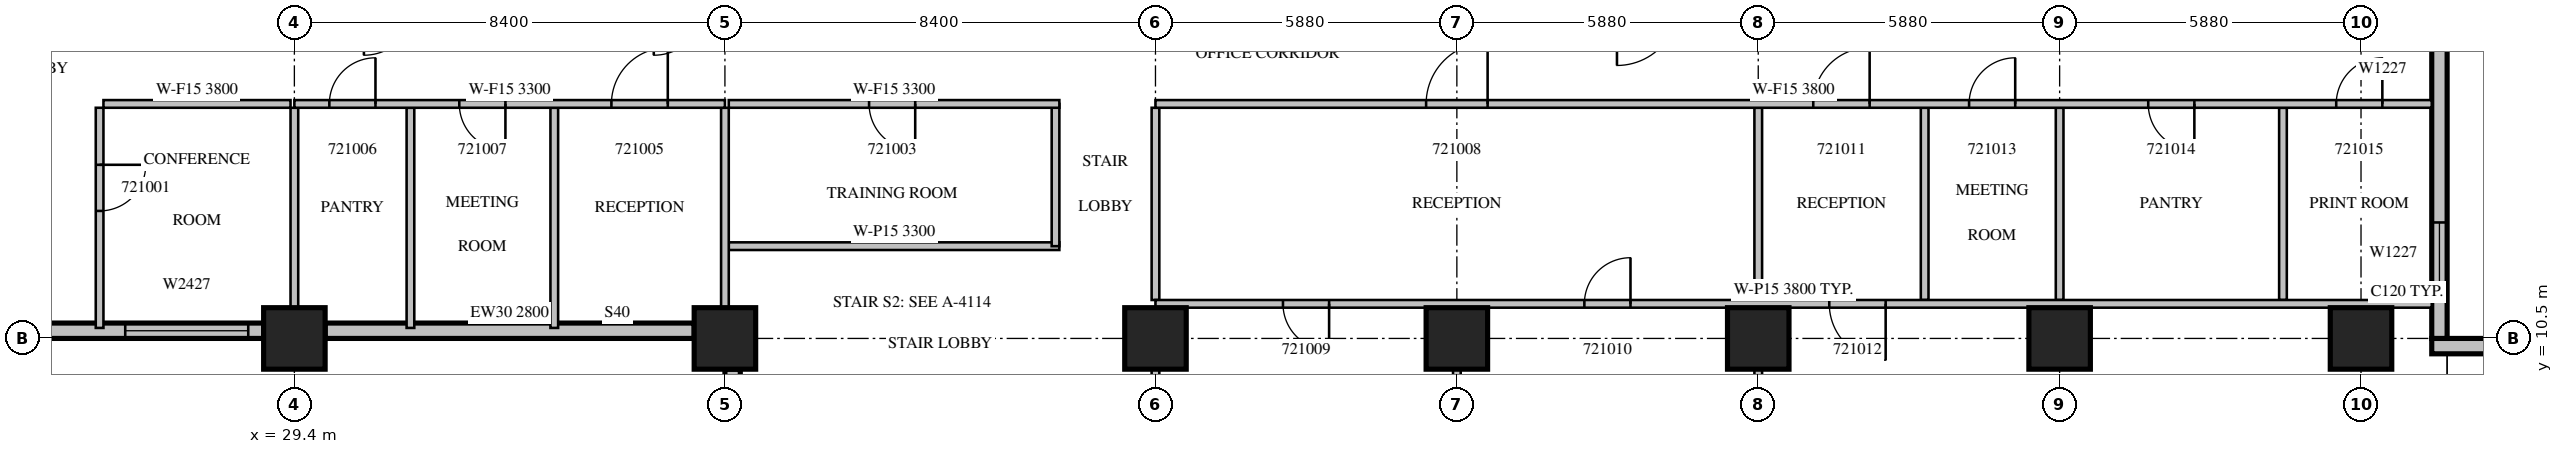
"""IFC4 building model, lengths in metres.
Left out: names, types, materials, properties, quantities, classifications, styles, units other than length and angle.
Written with IfcOpenShell. Run it as: python <this file> out.ifc"""

import sys

from ifc_helpers import new_model, si_unit, direction, frame, frame_2d, origin, origin_2d, place, context, subcontext, project, spatial, rectangle, extrude, source, transform, mapped, element, fill, save


model = new_model("IFC4")
c1 = context("Model", 3, precision=1e-05, world=origin(), true_north=direction((0.0, 1.0)))
c2 = subcontext(c1, "Body", "Model", "MODEL_VIEW")
j1 = project(units=[si_unit("LENGTHUNIT", "METRE"), si_unit("PLANEANGLEUNIT", "RADIAN")], contexts=[c1])
p1 = place(None, origin())
s1 = spatial("IfcSite", under=j1, at=p1, CompositionType="ELEMENT")
p2 = place(p1, origin())
s2 = spatial("IfcBuilding", under=s1, at=p2, CompositionType="ELEMENT")
p3 = place(p2, frame((0.0, 0.0, 99.3)))
s3 = spatial("IfcBuildingStorey", under=s2, at=p3, CompositionType="ELEMENT", Elevation=99.3)
m1 = source(origin(), c2, "Body", "SweptSolid", [
    extrude(rectangle(XDim=1.2, YDim=1.2, at=origin_2d()), origin(), (0.0, 0.0, 1.0), 4.2),
])
for number, where, z_axis, x_axis in (
    (1, (29.4, 10.5, 0.0), (0.0, 0.0, 1.0), (1.0, 0.0, 0.0)),
    (2, (37.8, 10.5, 0.0), (0.0, 0.0, 1.0), (1.0, 0.0, 0.0)),
    (3, (46.2, 10.5, 0.0), (0.0, 0.0, 1.0), (1.0, 0.0, 0.0)),
    (4, (52.08, 10.5, 0.0), (0.0, 0.0, 1.0), (1.0, 0.0, 0.0)),
    (5, (57.96, 10.5, 0.0), (0.0, 0.0, 1.0), (1.0, 0.0, 0.0)),
    (6, (63.84, 10.5, 0.0), (0.0, 0.0, 1.0), (1.0, 0.0, 0.0)),
    (7, (69.72, 10.5, 0.0), (0.0, 0.0, 1.0), (1.0, 0.0, 0.0)),
):
    element("IfcColumn", number, at=place(p3, frame(where, z_axis=z_axis, x_axis=x_axis)), inside=s3, PredefinedType="COLUMN", context=c2, shape_type="MappedRepresentation", body=[
        mapped(m1, transform((0.0, 0.0, 0.0), scale=1.0)),
    ])
m2 = source(origin(), c2, "Body", "SweptSolid", [
    extrude(rectangle(XDim=6.6, YDim=0.3, at=frame_2d((3.3, 0.0))), origin(), (0.0, 0.0, 1.0), 3.8),
])
p4 = place(p3, frame((22.2, 10.65, 0.0), z_axis=(0.0, 0.0, 1.0), x_axis=(1.0, 0.0, 0.0)))
e8 = element("IfcWall", 8, at=p4, inside=s3, PredefinedType="STANDARD", context=c2, shape_type="MappedRepresentation", body=[
    mapped(m2, transform((0.0, 0.0, 0.0), scale=1.0)),
])
m3 = source(origin(), c2, "Body", "SweptSolid", [
    extrude(rectangle(XDim=1.2, YDim=2.7, at=frame_2d((0.6, 1.35))), frame((0.0, 0.16, 0.0), z_axis=(0.0, -1.0, 0.0), x_axis=(1.0, 0.0, 0.0)), (0.0, 0.0, 1.0), 0.32),
])
p5 = place(p4, frame((0.3, 0.0, 0.6)))
e9 = element("IfcOpeningElement", 9, at=p5, cuts=e8, PredefinedType="OPENING", context=c2, shape_type="MappedRepresentation", body=[
    mapped(m3, transform((0.0, 0.0, 0.0), scale=1.0)),
])
m4 = source(origin(), c2, "Body", "SweptSolid", [
    extrude(rectangle(XDim=2.4, YDim=2.7, at=frame_2d((1.2, 1.35))), frame((0.0, 0.16, 0.0), z_axis=(0.0, -1.0, 0.0), x_axis=(1.0, 0.0, 0.0)), (0.0, 0.0, 1.0), 0.32),
])
p6 = place(p4, frame((3.9, 0.0, 0.6)))
e10 = element("IfcOpeningElement", 10, at=p6, cuts=e8, PredefinedType="OPENING", context=c2, shape_type="MappedRepresentation", body=[
    mapped(m4, transform((0.0, 0.0, 0.0), scale=1.0)),
])
m5 = source(origin(), c2, "Body", "SweptSolid", [
    extrude(rectangle(XDim=7.2, YDim=0.3, at=frame_2d((3.6, 0.0))), origin(), (0.0, 0.0, 1.0), 2.8),
])
p7 = place(p3, frame((30.0, 10.65, 0.0), z_axis=(0.0, 0.0, 1.0), x_axis=(1.0, 0.0, 0.0)))
e11 = element("IfcWall", 11, at=p7, inside=s3, PredefinedType="STANDARD", context=c2, shape_type="MappedRepresentation", body=[
    mapped(m5, transform((0.0, 0.0, 0.0), scale=1.0)),
])
m6 = source(origin(), c2, "Body", "SweptSolid", [
    extrude(rectangle(XDim=8.7, YDim=0.3, at=frame_2d((4.35, 0.0))), origin(), (0.0, 0.0, 1.0), 3.8),
])
p8 = place(p3, frame((37.95, 9.9, 0.0), z_axis=(0.0, 0.0, 1.0), x_axis=(0.0, -1.0, 0.0)))
e12 = element("IfcWall", 12, at=p8, inside=s3, PredefinedType="STANDARD", context=c2, shape_type="MappedRepresentation", body=[
    mapped(m6, transform((0.0, 0.0, 0.0), scale=1.0)),
])
m7 = source(origin(), c2, "Body", "SweptSolid", [
    extrude(rectangle(XDim=1.8, YDim=2.7, at=frame_2d((0.9, 1.35))), frame((0.0, 0.16, 0.0), z_axis=(0.0, -1.0, 0.0), x_axis=(1.0, 0.0, 0.0)), (0.0, 0.0, 1.0), 0.32),
])
p9 = place(p8, frame((1.812, 0.0, 0.6)))
e13 = element("IfcOpeningElement", 13, at=p9, cuts=e12, PredefinedType="OPENING", context=c2, shape_type="MappedRepresentation", body=[
    mapped(m7, transform((0.0, 0.0, 0.0), scale=1.0)),
])
p10 = place(p8, frame((6.075, 0.0, 0.6)))
e14 = element("IfcOpeningElement", 14, at=p10, cuts=e12, PredefinedType="OPENING", context=c2, shape_type="MappedRepresentation", body=[
    mapped(m4, transform((0.0, 0.0, 0.0), scale=1.0)),
])
m8 = source(origin(), c2, "Body", "SweptSolid", [
    extrude(rectangle(XDim=1.2, YDim=0.3, at=frame_2d((0.6, 0.0))), origin(), (0.0, 0.0, 1.0), 3.8),
])
p11 = place(p3, frame((71.1, 10.35, 0.0), z_axis=(0.0, 0.0, 1.0), x_axis=(1.0, 0.0, 0.0)))
e15 = element("IfcWall", 15, at=p11, inside=s3, PredefinedType="STANDARD", context=c2, shape_type="MappedRepresentation", body=[
    mapped(m8, transform((0.0, 0.0, 0.0), scale=1.0)),
])
m9 = source(origin(), c2, "Body", "SweptSolid", [
    extrude(rectangle(XDim=6.3, YDim=0.3, at=frame_2d((3.15, 0.0))), origin(), (0.0, 0.0, 1.0), 3.8),
])
p12 = place(p3, frame((71.25, 10.5, 0.0), z_axis=(0.0, 0.0, 1.0), x_axis=(0.0, 1.0, 0.0)))
e16 = element("IfcWall", 16, at=p12, inside=s3, PredefinedType="STANDARD", context=c2, shape_type="MappedRepresentation", body=[
    mapped(m9, transform((0.0, 0.0, 0.0), scale=1.0)),
])
p13 = place(p12, frame((1.062, 0.0, 0.6)))
e17 = element("IfcOpeningElement", 17, at=p13, cuts=e16, PredefinedType="OPENING", context=c2, shape_type="MappedRepresentation", body=[
    mapped(m3, transform((0.0, 0.0, 0.0), scale=1.0)),
])
m10 = source(origin(), c2, "Body", "SweptSolid", [
    extrude(rectangle(XDim=4.295, YDim=0.15, at=frame_2d((2.147, 0.0))), origin(), (0.0, 0.0, 1.0), 3.8),
])
p14 = place(p3, frame((25.6, 15.0, 0.0), z_axis=(0.0, 0.0, 1.0), x_axis=(0.0, -1.0, 0.0)))
e18 = element("IfcWall", 18, at=p14, inside=s3, PredefinedType="PARTITIONING", context=c2, shape_type="MappedRepresentation", body=[
    mapped(m10, transform((0.0, 0.0, 0.0), scale=1.0)),
])
m11 = source(origin(), c2, "Body", "SweptSolid", [
    extrude(rectangle(XDim=0.9, YDim=2.1, at=frame_2d((0.45, 1.05))), frame((0.0, 0.085, 0.0), z_axis=(0.0, -1.0, 0.0), x_axis=(1.0, 0.0, 0.0)), (0.0, 0.0, 1.0), 0.17),
])
p15 = place(p14, frame((1.113, 0.0, 0.0)))
e19 = element("IfcOpeningElement", 19, at=p15, cuts=e18, PredefinedType="OPENING", context=c2, shape_type="MappedRepresentation", body=[
    mapped(m11, transform((0.0, 0.0, 0.0), scale=1.0)),
])
m12 = source(origin(), c2, "Body", "SweptSolid", [
    extrude(rectangle(XDim=3.65, YDim=0.15, at=frame_2d((1.825, 0.0))), origin(), (0.0, 0.0, 1.0), 3.8),
])
p16 = place(p3, frame((29.325, 15.075, 0.0), z_axis=(0.0, 0.0, 1.0), x_axis=(-1.0, 0.0, 0.0)))
e20 = element("IfcWall", 20, at=p16, inside=s3, PredefinedType="PARTITIONING", context=c2, shape_type="MappedRepresentation", body=[
    mapped(m12, transform((0.0, 0.0, 0.0), scale=1.0)),
])
m13 = source(origin(), c2, "Body", "SweptSolid", [
    extrude(rectangle(XDim=3.901, YDim=0.15, at=frame_2d((1.95, 0.0))), origin(), (0.0, 0.0, 1.0), 3.8),
])
p17 = place(p3, frame((29.4, 11.099, 0.0), z_axis=(0.0, 0.0, 1.0), x_axis=(0.0, 1.0, 0.0)))
e21 = element("IfcWall", 21, at=p17, inside=s3, PredefinedType="PARTITIONING", context=c2, shape_type="MappedRepresentation", body=[
    mapped(m13, transform((0.0, 0.0, 0.0), scale=1.0)),
])
p18 = place(p3, frame((37.875, 12.3, 0.0), z_axis=(0.0, 0.0, 1.0), x_axis=(1.0, 0.0, 0.0)))
e22 = element("IfcWall", 22, at=p18, inside=s3, PredefinedType="PARTITIONING", context=c2, shape_type="SweptSolid", body=[
    extrude(rectangle(XDim=6.45, YDim=0.15, at=frame_2d((3.225, 0.0))), origin(), (0.0, 0.0, 1.0), 3.3),
])
m14 = source(origin(), c2, "Body", "SweptSolid", [
    extrude(rectangle(XDim=2.775, YDim=0.15, at=frame_2d((1.387, 0.0))), origin(), (0.0, 0.0, 1.0), 3.8),
])
p19 = place(p3, frame((44.25, 12.3, 0.0), z_axis=(0.0, 0.0, 1.0), x_axis=(0.0, 1.0, 0.0)))
e23 = element("IfcWall", 23, at=p19, inside=s3, PredefinedType="PARTITIONING", context=c2, shape_type="MappedRepresentation", body=[
    mapped(m14, transform((0.0, 0.0, 0.0), scale=1.0)),
])
m15 = source(origin(), c2, "Body", "SweptSolid", [
    extrude(rectangle(XDim=6.45, YDim=0.15, at=frame_2d((3.225, 0.0))), origin(), (0.0, 0.0, 1.0), 3.3),
])
p20 = place(p3, frame((44.325, 15.075, 0.0), z_axis=(0.0, 0.0, 1.0), x_axis=(-1.0, 0.0, 0.0)))
e24 = element("IfcWall", 24, at=p20, inside=s3, PredefinedType="PARTITIONING", context=c2, shape_type="MappedRepresentation", body=[
    mapped(m15, transform((0.0, 0.0, 0.0), scale=1.0)),
])
p21 = place(p20, frame((2.812, 0.0, 0.0)))
e25 = element("IfcOpeningElement", 25, at=p21, cuts=e24, PredefinedType="OPENING", context=c2, shape_type="MappedRepresentation", body=[
    mapped(m11, transform((0.0, 0.0, 0.0), scale=1.0)),
])
for number, where, z_axis, x_axis in (
    (26, (31.665, 10.705, 0.0), (0.0, 0.0, 1.0), (0.0, 1.0, 0.0)),
    (27, (34.471, 10.705, 0.0), (0.0, 0.0, 1.0), (0.0, 1.0, 0.0)),
):
    element("IfcWall", number, at=place(p3, frame(where, z_axis=z_axis, x_axis=x_axis)), inside=s3, PredefinedType="PARTITIONING", context=c2, shape_type="MappedRepresentation", body=[
        mapped(m10, transform((0.0, 0.0, 0.0), scale=1.0)),
    ])
p22 = place(p3, frame((37.8, 11.099, 0.0), z_axis=(0.0, 0.0, 1.0), x_axis=(0.0, 1.0, 0.0)))
e28 = element("IfcWall", 28, at=p22, inside=s3, PredefinedType="PARTITIONING", context=c2, shape_type="MappedRepresentation", body=[
    mapped(m13, transform((0.0, 0.0, 0.0), scale=1.0)),
])
m16 = source(origin(), c2, "Body", "SweptSolid", [
    extrude(rectangle(XDim=8.702, YDim=0.15, at=frame_2d((4.351, 0.0))), origin(), (0.0, 0.0, 1.0), 3.8),
])
p23 = place(p3, frame((52.08, 1.199, 0.0), z_axis=(0.0, 0.0, 1.0), x_axis=(0.0, 1.0, 0.0)))
e29 = element("IfcWall", 29, at=p23, inside=s3, PredefinedType="PARTITIONING", context=c2, shape_type="MappedRepresentation", body=[
    mapped(m16, transform((0.0, 0.0, 0.0), scale=1.0)),
])
m17 = source(origin(), c2, "Body", "SweptSolid", [
    extrude(rectangle(XDim=3.75, YDim=0.15, at=frame_2d((1.875, 0.0))), origin(), (0.0, 0.0, 1.0), 3.8),
])
for number, where, z_axis, x_axis in (
    (30, (61.207, 11.25, 0.0), (0.0, 0.0, 1.0), (0.0, 1.0, 0.0)),
    (31, (63.84, 11.25, 0.0), (0.0, 0.0, 1.0), (0.0, 1.0, 0.0)),
    (32, (68.197, 11.25, 0.0), (0.0, 0.0, 1.0), (0.0, 1.0, 0.0)),
):
    element("IfcWall", number, at=place(p3, frame(where, z_axis=z_axis, x_axis=x_axis)), inside=s3, PredefinedType="PARTITIONING", context=c2, shape_type="MappedRepresentation", body=[
        mapped(m17, transform((0.0, 0.0, 0.0), scale=1.0)),
    ])
p24 = place(p3, frame((46.2, 1.199, 0.0), z_axis=(0.0, 0.0, 1.0), x_axis=(0.0, 1.0, 0.0)))
e33 = element("IfcWall", 33, at=p24, inside=s3, PredefinedType="PARTITIONING", context=c2, shape_type="MappedRepresentation", body=[
    mapped(m16, transform((0.0, 0.0, 0.0), scale=1.0)),
])
p25 = place(p3, frame((46.2, 11.25, 0.0), z_axis=(0.0, 0.0, 1.0), x_axis=(0.0, 1.0, 0.0)))
e34 = element("IfcWall", 34, at=p25, inside=s3, PredefinedType="PARTITIONING", context=c2, shape_type="MappedRepresentation", body=[
    mapped(m17, transform((0.0, 0.0, 0.0), scale=1.0)),
])
p26 = place(p3, frame((57.96, 1.199, 0.0), z_axis=(0.0, 0.0, 1.0), x_axis=(0.0, 1.0, 0.0)))
e35 = element("IfcWall", 35, at=p26, inside=s3, PredefinedType="PARTITIONING", context=c2, shape_type="MappedRepresentation", body=[
    mapped(m16, transform((0.0, 0.0, 0.0), scale=1.0)),
])
p27 = place(p3, frame((57.96, 11.25, 0.0), z_axis=(0.0, 0.0, 1.0), x_axis=(0.0, 1.0, 0.0)))
e36 = element("IfcWall", 36, at=p27, inside=s3, PredefinedType="PARTITIONING", context=c2, shape_type="MappedRepresentation", body=[
    mapped(m17, transform((0.0, 0.0, 0.0), scale=1.0)),
])
m18 = source(origin(), c2, "Body", "SweptSolid", [
    extrude(rectangle(XDim=24.9, YDim=0.15, at=frame_2d((12.45, 0.0))), origin(), (0.0, 0.0, 1.0), 3.8),
])
p28 = place(p3, frame((71.1, 11.175, 0.0), z_axis=(0.0, 0.0, 1.0), x_axis=(-1.0, 0.0, 0.0)))
e37 = element("IfcWall", 37, at=p28, inside=s3, PredefinedType="PARTITIONING", context=c2, shape_type="MappedRepresentation", body=[
    mapped(m18, transform((0.0, 0.0, 0.0), scale=1.0)),
])
p29 = place(p28, frame((21.512, 0.0, 0.0)))
e38 = element("IfcOpeningElement", 38, at=p29, cuts=e37, PredefinedType="OPENING", context=c2, shape_type="MappedRepresentation", body=[
    mapped(m11, transform((0.0, 0.0, 0.0), scale=1.0)),
])
p30 = place(p28, frame((15.633, 0.0, 0.0)))
e39 = element("IfcOpeningElement", 39, at=p30, cuts=e37, PredefinedType="OPENING", context=c2, shape_type="MappedRepresentation", body=[
    mapped(m11, transform((0.0, 0.0, 0.0), scale=1.0)),
])
m19 = source(origin(), c2, "Body", "SweptSolid", [
    extrude(rectangle(XDim=1.1, YDim=2.1, at=frame_2d((0.55, 1.05))), frame((0.0, 0.085, 0.0), z_axis=(0.0, -1.0, 0.0), x_axis=(1.0, 0.0, 0.0)), (0.0, 0.0, 1.0), 0.17),
])
p31 = place(p28, frame((10.654, 0.0, 0.0)))
e40 = element("IfcOpeningElement", 40, at=p31, cuts=e37, PredefinedType="OPENING", context=c2, shape_type="MappedRepresentation", body=[
    mapped(m19, transform((0.0, 0.0, 0.0), scale=1.0)),
])
m20 = source(origin(), c2, "Body", "SweptSolid", [
    extrude(rectangle(XDim=8.4, YDim=0.15, at=frame_2d((4.2, 0.0))), origin(), (0.0, 0.0, 1.0), 3.3),
])
p32 = place(p3, frame((37.8, 15.075, 0.0), z_axis=(0.0, 0.0, 1.0), x_axis=(-1.0, 0.0, 0.0)))
e41 = element("IfcWall", 41, at=p32, inside=s3, PredefinedType="PARTITIONING", context=c2, shape_type="MappedRepresentation", body=[
    mapped(m20, transform((0.0, 0.0, 0.0), scale=1.0)),
])
p33 = place(p32, frame((1.115, 0.0, 0.0)))
e42 = element("IfcOpeningElement", 42, at=p33, cuts=e41, PredefinedType="OPENING", context=c2, shape_type="MappedRepresentation", body=[
    mapped(m19, transform((0.0, 0.0, 0.0), scale=1.0)),
])
p34 = place(p32, frame((6.818, 0.0, 0.0)))
e43 = element("IfcOpeningElement", 43, at=p34, cuts=e41, PredefinedType="OPENING", context=c2, shape_type="MappedRepresentation", body=[
    mapped(m11, transform((0.0, 0.0, 0.0), scale=1.0)),
])
p35 = place(p32, frame((4.282, 0.0, 0.0)))
e44 = element("IfcOpeningElement", 44, at=p35, cuts=e41, PredefinedType="OPENING", context=c2, shape_type="MappedRepresentation", body=[
    mapped(m11, transform((0.0, 0.0, 0.0), scale=1.0)),
])
p36 = place(p3, frame((71.1, 15.075, 0.0), z_axis=(0.0, 0.0, 1.0), x_axis=(-1.0, 0.0, 0.0)))
e45 = element("IfcWall", 45, at=p36, inside=s3, PredefinedType="PARTITIONING", context=c2, shape_type="MappedRepresentation", body=[
    mapped(m18, transform((0.0, 0.0, 0.0), scale=1.0)),
])
m21 = source(origin(), c2, "Body", "SweptSolid", [
    extrude(rectangle(XDim=1.2, YDim=2.1, at=frame_2d((0.6, 1.05))), frame((0.0, 0.085, 0.0), z_axis=(0.0, -1.0, 0.0), x_axis=(1.0, 0.0, 0.0)), (0.0, 0.0, 1.0), 0.17),
])
p37 = place(p36, frame((18.42, 0.0, 0.0)))
e46 = element("IfcOpeningElement", 46, at=p37, cuts=e45, PredefinedType="OPENING", context=c2, shape_type="MappedRepresentation", body=[
    mapped(m21, transform((0.0, 0.0, 0.0), scale=1.0)),
])
p38 = place(p36, frame((10.967, 0.0, 0.0)))
e47 = element("IfcOpeningElement", 47, at=p38, cuts=e45, PredefinedType="OPENING", context=c2, shape_type="MappedRepresentation", body=[
    mapped(m19, transform((0.0, 0.0, 0.0), scale=1.0)),
])
p39 = place(p36, frame((8.127, 0.0, 0.0)))
e48 = element("IfcOpeningElement", 48, at=p39, cuts=e45, PredefinedType="OPENING", context=c2, shape_type="MappedRepresentation", body=[
    mapped(m11, transform((0.0, 0.0, 0.0), scale=1.0)),
])
p40 = place(p36, frame((4.631, 0.0, 0.0)))
e49 = element("IfcOpeningElement", 49, at=p40, cuts=e45, PredefinedType="OPENING", context=c2, shape_type="MappedRepresentation", body=[
    mapped(m11, transform((0.0, 0.0, 0.0), scale=1.0)),
])
p41 = place(p36, frame((0.964, 0.0, 0.0)))
e50 = element("IfcOpeningElement", 50, at=p41, cuts=e45, PredefinedType="OPENING", context=c2, shape_type="MappedRepresentation", body=[
    mapped(m11, transform((0.0, 0.0, 0.0), scale=1.0)),
])
m22 = source(origin(), c2, "Body", "SweptSolid", [
    extrude(rectangle(XDim=2.4, YDim=2.7, at=frame_2d((1.2, 1.35))), frame((0.0, 0.03, 0.0), z_axis=(0.0, -1.0, 0.0), x_axis=(1.0, 0.0, 0.0)), (0.0, 0.0, 1.0), 0.06),
])
p42 = place(p6, origin())
e51 = element("IfcWindow", 51, at=p42, inside=s3, PartitioningType="SINGLE_PANEL", PredefinedType="WINDOW", context=c2, shape_type="MappedRepresentation", body=[
    mapped(m22, transform((0.0, 0.0, 0.0), scale=1.0)),
])
fill(e10, e51)
m23 = source(origin(), c2, "Body", "SweptSolid", [
    extrude(rectangle(XDim=1.2, YDim=2.7, at=frame_2d((0.6, 1.35))), frame((0.0, 0.03, 0.0), z_axis=(0.0, -1.0, 0.0), x_axis=(1.0, 0.0, 0.0)), (0.0, 0.0, 1.0), 0.06),
])
p43 = place(p13, origin())
e52 = element("IfcWindow", 52, at=p43, inside=s3, PartitioningType="SINGLE_PANEL", PredefinedType="WINDOW", context=c2, shape_type="MappedRepresentation", body=[
    mapped(m23, transform((0.0, 0.0, 0.0), scale=1.0)),
])
fill(e17, e52)
m24 = source(origin(), c2, "Body", "SweptSolid", [
    extrude(rectangle(XDim=0.9, YDim=2.1, at=frame_2d((0.45, 1.05))), frame((0.0, 0.025, 0.0), z_axis=(0.0, -1.0, 0.0), x_axis=(1.0, 0.0, 0.0)), (0.0, 0.0, 1.0), 0.05),
])
p44 = place(p15, origin())
e53 = element("IfcDoor", 53, at=p44, inside=s3, OperationType="SINGLE_SWING_LEFT", PredefinedType="DOOR", context=c2, shape_type="MappedRepresentation", body=[
    mapped(m24, transform((0.0, 0.0, 0.0), scale=1.0)),
])
fill(e19, e53)
p45 = place(p21, origin())
e54 = element("IfcDoor", 54, at=p45, inside=s3, OperationType="SINGLE_SWING_LEFT", PredefinedType="DOOR", context=c2, shape_type="MappedRepresentation", body=[
    mapped(m24, transform((0.0, 0.0, 0.0), scale=1.0)),
])
fill(e25, e54)
m25 = source(origin(), c2, "Body", "SweptSolid", [
    extrude(rectangle(XDim=1.1, YDim=2.1, at=frame_2d((0.55, 1.05))), frame((0.0, 0.025, 0.0), z_axis=(0.0, -1.0, 0.0), x_axis=(1.0, 0.0, 0.0)), (0.0, 0.0, 1.0), 0.05),
])
p46 = place(p33, origin())
e55 = element("IfcDoor", 55, at=p46, inside=s3, OperationType="SINGLE_SWING_RIGHT", PredefinedType="DOOR", context=c2, shape_type="MappedRepresentation", body=[
    mapped(m25, transform((0.0, 0.0, 0.0), scale=1.0)),
])
fill(e42, e55)
p47 = place(p34, origin())
e56 = element("IfcDoor", 56, at=p47, inside=s3, OperationType="SINGLE_SWING_RIGHT", PredefinedType="DOOR", context=c2, shape_type="MappedRepresentation", body=[
    mapped(m24, transform((0.0, 0.0, 0.0), scale=1.0)),
])
fill(e43, e56)
p48 = place(p35, origin())
e57 = element("IfcDoor", 57, at=p48, inside=s3, OperationType="SINGLE_SWING_LEFT", PredefinedType="DOOR", context=c2, shape_type="MappedRepresentation", body=[
    mapped(m24, transform((0.0, 0.0, 0.0), scale=1.0)),
])
fill(e44, e57)
m26 = source(origin(), c2, "Body", "SweptSolid", [
    extrude(rectangle(XDim=1.2, YDim=2.1, at=frame_2d((0.6, 1.05))), frame((0.0, 0.025, 0.0), z_axis=(0.0, -1.0, 0.0), x_axis=(1.0, 0.0, 0.0)), (0.0, 0.0, 1.0), 0.05),
])
p49 = place(p37, origin())
e58 = element("IfcDoor", 58, at=p49, inside=s3, OperationType="SINGLE_SWING_RIGHT", PredefinedType="DOOR", context=c2, shape_type="MappedRepresentation", body=[
    mapped(m26, transform((0.0, 0.0, 0.0), scale=1.0)),
])
fill(e46, e58)
p50 = place(p29, origin())
e59 = element("IfcDoor", 59, at=p50, inside=s3, OperationType="SINGLE_SWING_LEFT", PredefinedType="DOOR", context=c2, shape_type="MappedRepresentation", body=[
    mapped(m24, transform((0.0, 0.0, 0.0), scale=1.0)),
])
fill(e38, e59)
p51 = place(p30, origin())
e60 = element("IfcDoor", 60, at=p51, inside=s3, OperationType="SINGLE_SWING_RIGHT", PredefinedType="DOOR", context=c2, shape_type="MappedRepresentation", body=[
    mapped(m24, transform((0.0, 0.0, 0.0), scale=1.0)),
])
fill(e39, e60)
p52 = place(p38, origin())
e61 = element("IfcDoor", 61, at=p52, inside=s3, OperationType="SINGLE_SWING_RIGHT", PredefinedType="DOOR", context=c2, shape_type="MappedRepresentation", body=[
    mapped(m25, transform((0.0, 0.0, 0.0), scale=1.0)),
])
fill(e47, e61)
p53 = place(p31, origin())
e62 = element("IfcDoor", 62, at=p53, inside=s3, OperationType="SINGLE_SWING_LEFT", PredefinedType="DOOR", context=c2, shape_type="MappedRepresentation", body=[
    mapped(m25, transform((0.0, 0.0, 0.0), scale=1.0)),
])
fill(e40, e62)
p54 = place(p39, origin())
e63 = element("IfcDoor", 63, at=p54, inside=s3, OperationType="SINGLE_SWING_RIGHT", PredefinedType="DOOR", context=c2, shape_type="MappedRepresentation", body=[
    mapped(m24, transform((0.0, 0.0, 0.0), scale=1.0)),
])
fill(e48, e63)
p55 = place(p40, origin())
e64 = element("IfcDoor", 64, at=p55, inside=s3, OperationType="SINGLE_SWING_LEFT", PredefinedType="DOOR", context=c2, shape_type="MappedRepresentation", body=[
    mapped(m24, transform((0.0, 0.0, 0.0), scale=1.0)),
])
fill(e49, e64)
p56 = place(p41, origin())
e65 = element("IfcDoor", 65, at=p56, inside=s3, OperationType="SINGLE_SWING_RIGHT", PredefinedType="DOOR", context=c2, shape_type="MappedRepresentation", body=[
    mapped(m24, transform((0.0, 0.0, 0.0), scale=1.0)),
])
fill(e50, e65)
save(model, sys.argv[1])
